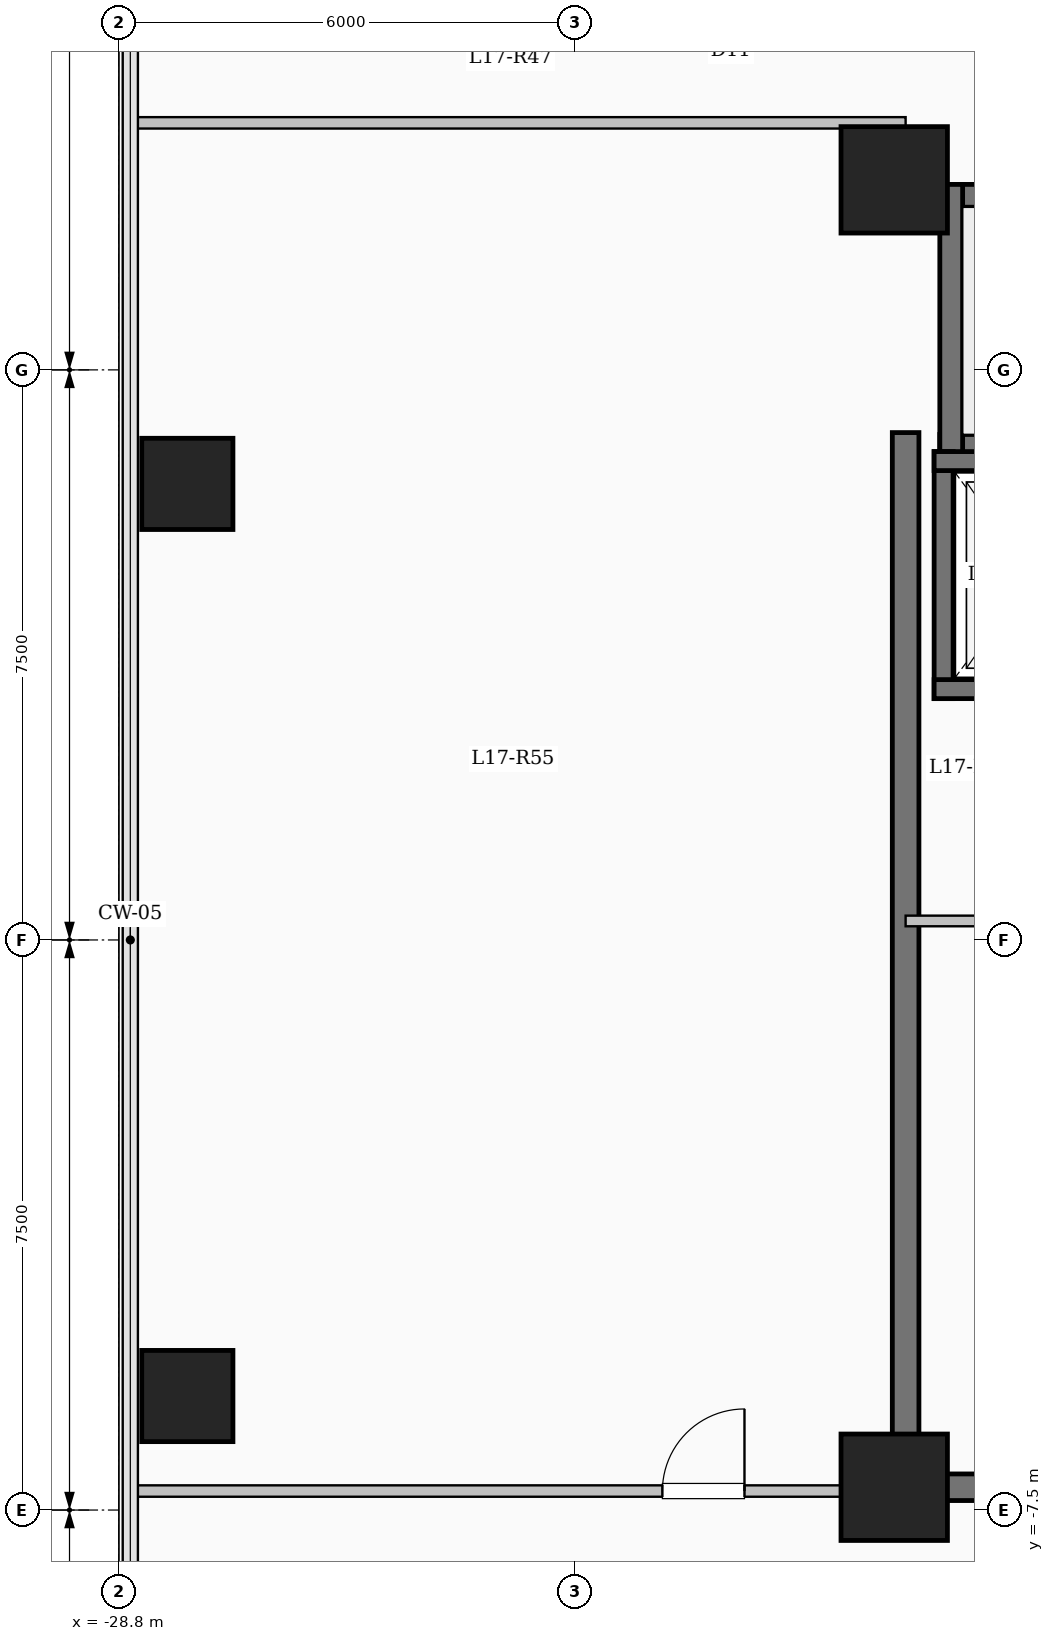
"""IFC4 building model, lengths in metres.
Left out: names, types, materials, properties, quantities, classifications, styles, units other than length and angle.
Written with IfcOpenShell. Run it as: python <this file> out.ifc"""

import sys

from ifc_helpers import new_model, si_unit, direction, frame, frame_2d, origin, origin_2d, place, context, subcontext, project, spatial, rectangle, extrude, element, fill, save


model = new_model("IFC4")
c1 = context("Model", 3, precision=1e-05, world=origin(), true_north=direction((0.0, 1.0)))
c2 = subcontext(c1, "Body", "Model", "MODEL_VIEW")
j1 = project(units=[si_unit("LENGTHUNIT", "METRE"), si_unit("PLANEANGLEUNIT", "RADIAN")], contexts=[c1])
p1 = place(None, origin())
s1 = spatial("IfcSite", under=j1, at=p1, CompositionType="ELEMENT")
p2 = place(p1, origin())
s2 = spatial("IfcBuilding", under=s1, at=p2, CompositionType="ELEMENT")
p3 = place(p2, frame((0.0, 0.0, 64.2)))
s3 = spatial("IfcBuildingStorey", under=s2, at=p3, CompositionType="ELEMENT", Elevation=64.2)
for number, where, z_axis, x_axis in (
    (1, (-18.6, -7.2, 0.0), (0.0, 0.0, 1.0), (1.0, 0.0, 0.0)),
    (2, (-18.6, 10.0, 0.0), (0.0, 0.0, 1.0), (1.0, 0.0, 0.0)),
):
    element("IfcColumn", number, at=place(p3, frame(where, z_axis=z_axis, x_axis=x_axis)), inside=s3, PredefinedType="COLUMN", context=c2, shape_type="SweptSolid", body=[
        extrude(rectangle(XDim=1.4, YDim=1.4, at=origin_2d()), origin(), (0.0, 0.0, 1.0), 4.5),
    ])
for number, where, z_axis, x_axis in (
    (3, (-27.9, -6.0, 0.0), (0.0, 0.0, 1.0), (1.0, 0.0, 0.0)),
    (4, (-27.9, 6.0, 0.0), (0.0, 0.0, 1.0), (1.0, 0.0, 0.0)),
):
    element("IfcColumn", number, at=place(p3, frame(where, z_axis=z_axis, x_axis=x_axis)), inside=s3, PredefinedType="COLUMN", context=c2, shape_type="SweptSolid", body=[
        extrude(rectangle(XDim=1.2, YDim=1.2, at=origin_2d()), origin(), (0.0, 0.0, 1.0), 4.5),
    ])
p4 = place(p3, frame((-18.0, 9.79, 0.0), z_axis=(0.0, 0.0, 1.0), x_axis=(1.0, 0.0, 0.0)))
e5 = element("IfcWall", 5, at=p4, inside=s3, PredefinedType="SHEAR", context=c2, shape_type="SweptSolid", body=[
    extrude(rectangle(XDim=8.0, YDim=0.3, at=frame_2d((4.0, 0.0))), origin(), (0.0, 0.0, 1.0), 4.5),
])
p5 = place(p3, frame((-18.0, 6.5, 0.0), z_axis=(0.0, 0.0, 1.0), x_axis=(1.0, 0.0, 0.0)))
e6 = element("IfcWall", 6, at=p5, inside=s3, PredefinedType="SHEAR", context=c2, shape_type="SweptSolid", body=[
    extrude(rectangle(XDim=8.0, YDim=0.3, at=frame_2d((4.0, 0.0))), origin(), (0.0, 0.0, 1.0), 4.5),
])
p6 = place(p5, frame((6.45, 0.0, 0.0)))
e7 = element("IfcOpeningElement", 7, at=p6, cuts=e6, PredefinedType="OPENING", context=c2, shape_type="SweptSolid", body=[
    extrude(rectangle(XDim=1.0, YDim=2.15, at=frame_2d((0.5, 1.075))), frame((0.0, 0.16, 0.0), z_axis=(0.0, -1.0, 0.0), x_axis=(1.0, 0.0, 0.0)), (0.0, 0.0, 1.0), 0.32),
])
p7 = place(p3, frame((-17.85, 6.35, 0.0), z_axis=(0.0, 0.0, 1.0), x_axis=(0.0, 1.0, 0.0)))
e8 = element("IfcWall", 8, at=p7, inside=s3, PredefinedType="SHEAR", context=c2, shape_type="SweptSolid", body=[
    extrude(rectangle(XDim=3.59, YDim=0.3, at=frame_2d((1.795, 0.0))), origin(), (0.0, 0.0, 1.0), 4.5),
])
p8 = place(p3, frame((-17.95, 3.175, 0.0), z_axis=(0.0, 0.0, 1.0), x_axis=(0.0, 1.0, 0.0)))
e9 = element("IfcWall", 9, at=p8, inside=s3, PredefinedType="SHEAR", context=c2, shape_type="SweptSolid", body=[
    extrude(rectangle(XDim=3.25, YDim=0.25, at=frame_2d((1.625, 0.0))), origin(), (0.0, 0.0, 1.0), 4.5),
])
for number, where, z_axis, x_axis in (
    (10, (-18.075, 3.3, 0.0), (0.0, 0.0, 1.0), (1.0, 0.0, 0.0)),
    (11, (-18.075, 6.3, 0.0), (0.0, 0.0, 1.0), (1.0, 0.0, 0.0)),
):
    element("IfcWall", number, at=place(p3, frame(where, z_axis=z_axis, x_axis=x_axis)), inside=s3, PredefinedType="SHEAR", context=c2, shape_type="SweptSolid", body=[
        extrude(rectangle(XDim=2.55, YDim=0.25, at=frame_2d((1.275, 0.0))), origin(), (0.0, 0.0, 1.0), 4.5),
    ])
p9 = place(p3, frame((-18.45, -7.375, 0.0), z_axis=(0.0, 0.0, 1.0), x_axis=(0.0, 1.0, 0.0)))
e12 = element("IfcWall", 12, at=p9, inside=s3, PredefinedType="SHEAR", context=c2, shape_type="SweptSolid", body=[
    extrude(rectangle(XDim=14.05, YDim=0.35, at=frame_2d((7.025, 0.0))), origin(), (0.0, 0.0, 1.0), 4.5),
])
p10 = place(p3, frame((-18.625, -7.2, 0.0), z_axis=(0.0, 0.0, 1.0), x_axis=(1.0, 0.0, 0.0)))
e13 = element("IfcWall", 13, at=p10, inside=s3, PredefinedType="SHEAR", context=c2, shape_type="SweptSolid", body=[
    extrude(rectangle(XDim=8.55, YDim=0.35, at=frame_2d((4.275, 0.0))), origin(), (0.0, 0.0, 1.0), 4.5),
])
p11 = place(p3, frame((-18.45, 0.25, 0.0), z_axis=(0.0, 0.0, 1.0), x_axis=(1.0, 0.0, 0.0)))
e14 = element("IfcWall", 14, at=p11, inside=s3, PredefinedType="PARTITIONING", context=c2, shape_type="SweptSolid", body=[
    extrude(rectangle(XDim=3.05, YDim=0.14, at=frame_2d((1.525, 0.0))), origin(), (0.0, 0.0, 1.0), 4.2),
])
p12 = place(p11, frame((1.05, 0.0, 0.0)))
e15 = element("IfcOpeningElement", 15, at=p12, cuts=e14, PredefinedType="OPENING", context=c2, shape_type="SweptSolid", body=[
    extrude(rectangle(XDim=0.9, YDim=2.08, at=frame_2d((0.45, 1.04))), frame((0.0, 0.08, 0.0), z_axis=(0.0, -1.0, 0.0), x_axis=(1.0, 0.0, 0.0)), (0.0, 0.0, 1.0), 0.16),
])
p13 = place(p3, frame((-28.68, -7.25, 0.0), z_axis=(0.0, 0.0, 1.0), x_axis=(1.0, 0.0, 0.0)))
e16 = element("IfcWall", 16, at=p13, inside=s3, PredefinedType="PARTITIONING", context=c2, shape_type="SweptSolid", body=[
    extrude(rectangle(XDim=10.23, YDim=0.15, at=frame_2d((5.115, 0.0))), origin(), (0.0, 0.0, 1.0), 4.2),
])
p14 = place(p13, frame((7.03, 0.0, 0.0)))
e17 = element("IfcOpeningElement", 17, at=p14, cuts=e16, PredefinedType="OPENING", context=c2, shape_type="SweptSolid", body=[
    extrude(rectangle(XDim=1.08, YDim=2.15, at=frame_2d((0.54, 1.075))), frame((0.0, 0.085, 0.0), z_axis=(0.0, -1.0, 0.0), x_axis=(1.0, 0.0, 0.0)), (0.0, 0.0, 1.0), 0.17),
])
p15 = place(p3, frame((-28.68, 10.75, 0.0), z_axis=(0.0, 0.0, 1.0), x_axis=(1.0, 0.0, 0.0)))
e18 = element("IfcWall", 18, at=p15, inside=s3, PredefinedType="PARTITIONING", context=c2, shape_type="SweptSolid", body=[
    extrude(rectangle(XDim=10.23, YDim=0.15, at=frame_2d((5.115, 0.0))), origin(), (0.0, 0.0, 1.0), 4.2),
])
p16 = place(p14, origin())
e19 = element("IfcDoor", 19, at=p16, inside=s3, OperationType="SINGLE_SWING_RIGHT", PredefinedType="DOOR", context=c2, shape_type="SweptSolid", body=[
    extrude(rectangle(XDim=1.08, YDim=2.15, at=frame_2d((0.54, 1.075))), frame((0.0, 0.025, 0.0), z_axis=(0.0, -1.0, 0.0), x_axis=(1.0, 0.0, 0.0)), (0.0, 0.0, 1.0), 0.05),
])
fill(e17, e19)
save(model, sys.argv[1])
